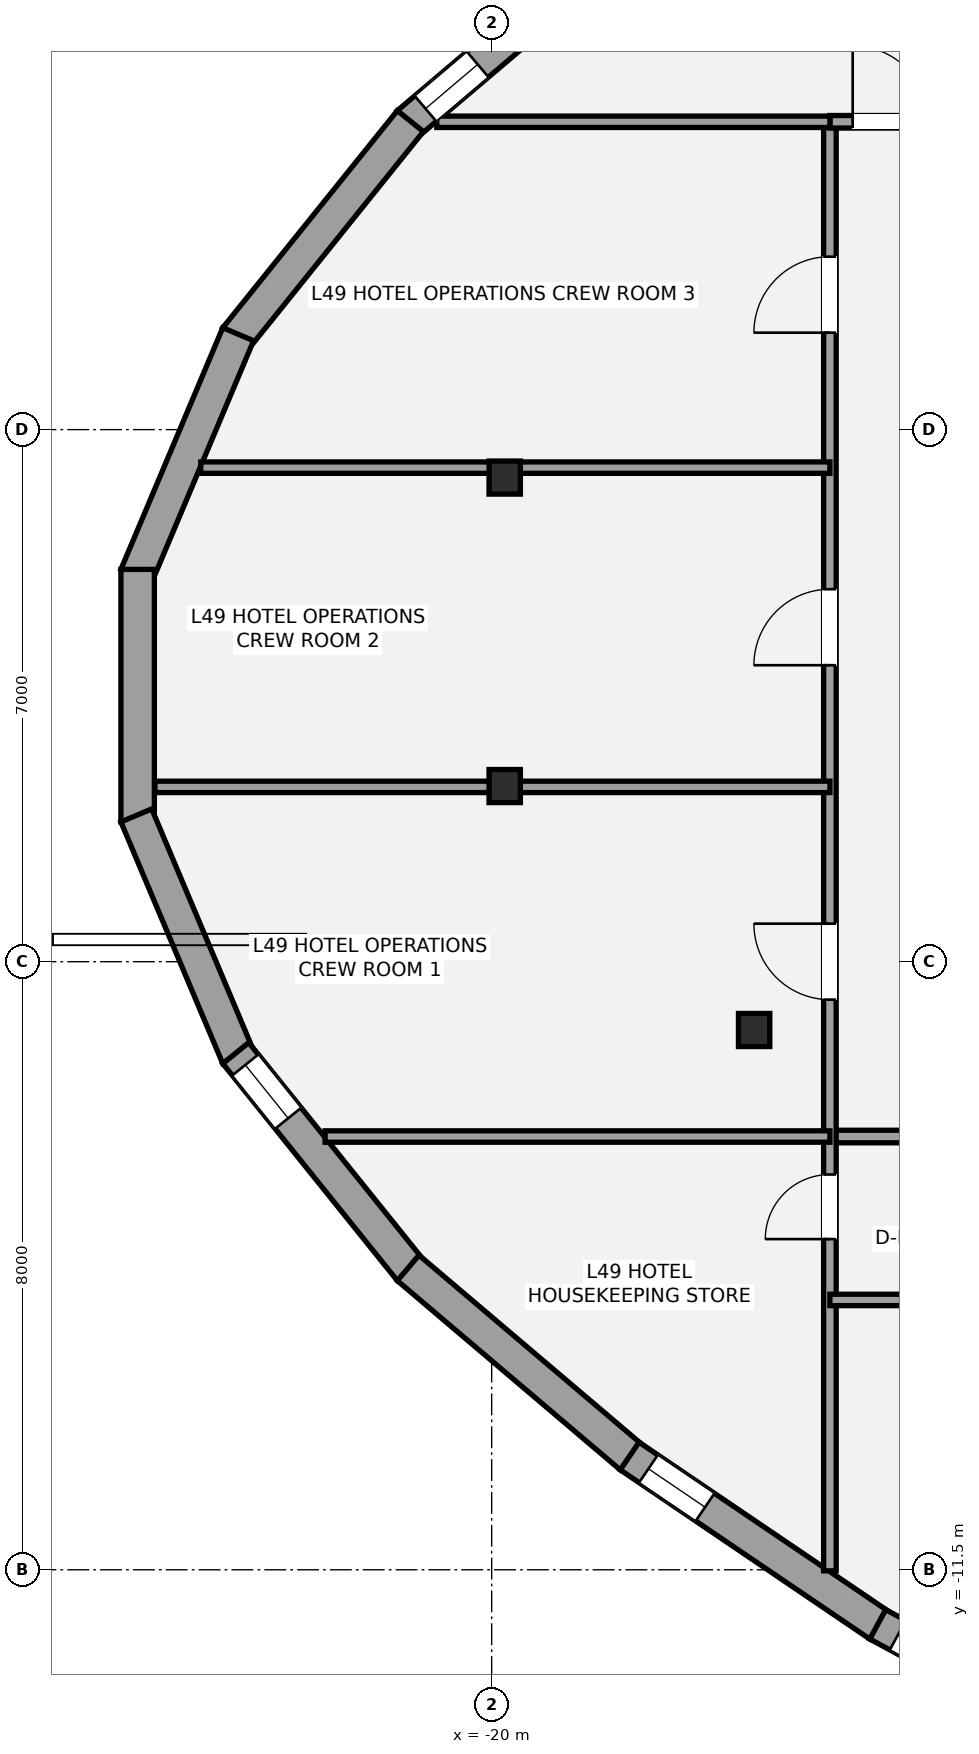
"""IFC4 building model, lengths in metres.
Left out: names, types, materials, properties, quantities, classifications, styles, units other than length and angle.
Written with IfcOpenShell. Run it as: python <this file> out.ifc"""

import sys

from ifc_helpers import new_model, si_unit, direction, frame, frame_2d, origin, origin_2d, place, context, subcontext, project, spatial, rectangle, i_section, extrude, element, fill, save


model = new_model("IFC4")
c1 = context("Model", 3, precision=1e-05, world=origin(), true_north=direction((0.0, 1.0)))
c2 = subcontext(c1, "Body", "Model", "MODEL_VIEW")
j1 = project(units=[si_unit("LENGTHUNIT", "METRE"), si_unit("PLANEANGLEUNIT", "RADIAN")], contexts=[c1])
p1 = place(None, origin())
s1 = spatial("IfcSite", under=j1, at=p1, CompositionType="ELEMENT")
p2 = place(p1, origin())
s2 = spatial("IfcBuilding", under=s1, at=p2, CompositionType="ELEMENT")
p3 = place(p2, frame((0.0, 0.0, 179.0)))
s3 = spatial("IfcBuildingStorey", under=s2, at=p3, CompositionType="ELEMENT", Elevation=179.0)
for number, where, z_axis, x_axis in (
    (1, (-19.828, 2.869, 0.0), (0.0, 0.0, 1.0), (1.0, 0.0, 0.0)),
    (2, (-19.828, -1.189, 0.0), (0.0, 0.0, 1.0), (1.0, 0.0, 0.0)),
    (3, (-16.547, -4.398, 0.0), (0.0, 0.0, 1.0), (1.0, 0.0, 0.0)),
):
    element("IfcColumn", number, at=place(p3, frame(where, z_axis=z_axis, x_axis=x_axis)), inside=s3, PredefinedType="COLUMN", context=c2, shape_type="SweptSolid", body=[
        extrude(i_section(OverallWidth=0.412, OverallDepth=0.435, WebThickness=0.036, FlangeThickness=0.057, at=origin_2d()), origin(), (0.0, 0.0, 1.0), 3.2),
    ])
p4 = place(p3, frame((-21.099, 7.529, 0.0), z_axis=(0.0, 0.0, 1.0), x_axis=(0.762499647343, 0.646988630349, 0.0)))
e4 = element("IfcWall", 4, at=p4, inside=s3, PredefinedType="STANDARD", context=c2, shape_type="SweptSolid", body=[
    extrude(rectangle(XDim=3.847, YDim=0.44, at=frame_2d((1.923, 0.0))), origin(), (0.0, 0.0, 1.0), 2.315),
])
p5 = place(p4, frame((0.3, 0.0, 0.42)))
e5 = element("IfcOpeningElement", 5, at=p5, cuts=e4, PredefinedType="OPENING", context=c2, shape_type="SweptSolid", body=[
    extrude(rectangle(XDim=0.9, YDim=1.35, at=frame_2d((0.45, 0.675))), frame((0.0, 0.23, 0.0), z_axis=(0.0, -1.0, 0.0), x_axis=(1.0, 0.0, 0.0)), (0.0, 0.0, 1.0), 0.46),
])
p6 = place(p3, frame((-23.367, 4.702, 0.0), z_axis=(0.0, 0.0, 1.0), x_axis=(0.626642586146, 0.779306787618, 0.0)))
e6 = element("IfcWall", 6, at=p6, inside=s3, PredefinedType="STANDARD", context=c2, shape_type="SweptSolid", body=[
    extrude(rectangle(XDim=3.665, YDim=0.44, at=frame_2d((1.833, 0.0))), origin(), (0.0, 0.0, 1.0), 2.315),
])
p7 = place(p3, frame((-24.675, 1.576, 0.0), z_axis=(0.0, 0.0, 1.0), x_axis=(0.388360687569, 0.9215074478, 0.0)))
e7 = element("IfcWall", 7, at=p7, inside=s3, PredefinedType="STANDARD", context=c2, shape_type="SweptSolid", body=[
    extrude(rectangle(XDim=3.45, YDim=0.44, at=frame_2d((1.725, 0.0))), origin(), (0.0, 0.0, 1.0), 2.315),
])
p8 = place(p3, frame((-24.658, -1.661, 0.0), z_axis=(0.0, 0.0, 1.0), x_axis=(0.0, 1.0, 0.0)))
e8 = element("IfcWall", 8, at=p8, inside=s3, PredefinedType="STANDARD", context=c2, shape_type="SweptSolid", body=[
    extrude(rectangle(XDim=3.322, YDim=0.44, at=frame_2d((1.661, 0.0))), origin(), (0.0, 0.0, 1.0), 2.315),
])
p9 = place(p3, frame((-23.335, -4.755, 0.0), z_axis=(0.0, 0.0, 1.0), x_axis=(-0.388360687569, 0.9215074478, 0.0)))
e9 = element("IfcWall", 9, at=p9, inside=s3, PredefinedType="STANDARD", context=c2, shape_type="SweptSolid", body=[
    extrude(rectangle(XDim=3.45, YDim=0.44, at=frame_2d((1.725, 0.0))), origin(), (0.0, 0.0, 1.0), 2.315),
])
p10 = place(p3, frame((-21.07, -7.559, 0.0), z_axis=(0.0, 0.0, 1.0), x_axis=(-0.626642586146, 0.779306787618, 0.0)))
e10 = element("IfcWall", 10, at=p10, inside=s3, PredefinedType="STANDARD", context=c2, shape_type="SweptSolid", body=[
    extrude(rectangle(XDim=3.665, YDim=0.44, at=frame_2d((1.833, 0.0))), origin(), (0.0, 0.0, 1.0), 2.315),
])
p11 = place(p10, frame((2.565, 0.0, 0.42)))
e11 = element("IfcOpeningElement", 11, at=p11, cuts=e10, PredefinedType="OPENING", context=c2, shape_type="SweptSolid", body=[
    extrude(rectangle(XDim=0.9, YDim=1.35, at=frame_2d((0.45, 0.675))), frame((0.0, 0.23, 0.0), z_axis=(0.0, -1.0, 0.0), x_axis=(1.0, 0.0, 0.0)), (0.0, 0.0, 1.0), 0.46),
])
p12 = place(p3, frame((-18.166, -10.018, 0.0), z_axis=(0.0, 0.0, 1.0), x_axis=(-0.762499647343, 0.646988630349, 0.0)))
e12 = element("IfcWall", 12, at=p12, inside=s3, PredefinedType="STANDARD", context=c2, shape_type="SweptSolid", body=[
    extrude(rectangle(XDim=3.847, YDim=0.44, at=frame_2d((1.923, 0.0))), origin(), (0.0, 0.0, 1.0), 2.315),
])
p13 = place(p3, frame((-14.902, -12.229, 0.0), z_axis=(0.0, 0.0, 1.0), x_axis=(-0.827725942945, 0.561132572015, 0.0)))
e13 = element("IfcWall", 13, at=p13, inside=s3, PredefinedType="STANDARD", context=c2, shape_type="SweptSolid", body=[
    extrude(rectangle(XDim=3.966, YDim=0.44, at=frame_2d((1.983, 0.0))), origin(), (0.0, 0.0, 1.0), 2.315),
])
p14 = place(p13, frame((2.768, 0.0, 0.58)))
e14 = element("IfcOpeningElement", 14, at=p14, cuts=e13, PredefinedType="OPENING", context=c2, shape_type="SweptSolid", body=[
    extrude(rectangle(XDim=0.9, YDim=1.35, at=frame_2d((0.45, 0.675))), frame((0.0, 0.23, 0.0), z_axis=(0.0, -1.0, 0.0), x_axis=(1.0, 0.0, 0.0)), (0.0, 0.0, 1.0), 0.46),
])
p15 = place(p3, frame((-11.249, -14.206, 0.0), z_axis=(0.0, 0.0, 1.0), x_axis=(-0.879306250646, 0.476256776933, 0.0)))
e15 = element("IfcWall", 15, at=p15, inside=s3, PredefinedType="STANDARD", context=c2, shape_type="SweptSolid", body=[
    extrude(rectangle(XDim=4.175, YDim=0.44, at=frame_2d((2.088, 0.0))), origin(), (0.0, 0.0, 1.0), 2.315),
])
p16 = place(p15, frame((2.976, 0.0, 0.58)))
e16 = element("IfcOpeningElement", 16, at=p16, cuts=e15, PredefinedType="OPENING", context=c2, shape_type="SweptSolid", body=[
    extrude(rectangle(XDim=0.9, YDim=1.35, at=frame_2d((0.45, 0.675))), frame((0.0, 0.23, 0.0), z_axis=(0.0, -1.0, 0.0), x_axis=(1.0, 0.0, 0.0)), (0.0, 0.0, 1.0), 0.46),
])
p17 = place(p3, frame((-15.55, -5.8, 0.0), z_axis=(0.0, 0.0, 1.0), x_axis=(1.0, 0.0, 0.0)))
e17 = element("IfcWall", 17, at=p17, inside=s3, PredefinedType="PARTITIONING", context=c2, shape_type="SweptSolid", body=[
    extrude(rectangle(XDim=31.1, YDim=0.165, at=frame_2d((15.55, 0.0))), origin(), (0.0, 0.0, 1.0), 2.398),
])
p18 = place(p17, frame((5.4, 0.0, 0.0)))
e18 = element("IfcOpeningElement", 18, at=p18, cuts=e17, PredefinedType="OPENING", context=c2, shape_type="SweptSolid", body=[
    extrude(rectangle(XDim=0.95, YDim=2.15, at=frame_2d((0.475, 1.075))), frame((0.0, 0.093, 0.0), z_axis=(0.0, -1.0, 0.0), x_axis=(1.0, 0.0, 0.0)), (0.0, 0.0, 1.0), 0.185),
])
p19 = place(p17, frame((13.2, 0.0, 0.0)))
e19 = element("IfcOpeningElement", 19, at=p19, cuts=e17, PredefinedType="OPENING", context=c2, shape_type="SweptSolid", body=[
    extrude(rectangle(XDim=0.95, YDim=2.15, at=frame_2d((0.475, 1.075))), frame((0.0, 0.093, 0.0), z_axis=(0.0, -1.0, 0.0), x_axis=(1.0, 0.0, 0.0)), (0.0, 0.0, 1.0), 0.185),
])
p20 = place(p17, frame((21.0, 0.0, 0.0)))
e20 = element("IfcOpeningElement", 20, at=p20, cuts=e17, PredefinedType="OPENING", context=c2, shape_type="SweptSolid", body=[
    extrude(rectangle(XDim=0.95, YDim=2.15, at=frame_2d((0.475, 1.075))), frame((0.0, 0.093, 0.0), z_axis=(0.0, -1.0, 0.0), x_axis=(1.0, 0.0, 0.0)), (0.0, 0.0, 1.0), 0.185),
])
p21 = place(p17, frame((29.75, 0.0, 0.0)))
e21 = element("IfcOpeningElement", 21, at=p21, cuts=e17, PredefinedType="OPENING", context=c2, shape_type="SweptSolid", body=[
    extrude(rectangle(XDim=0.95, YDim=2.15, at=frame_2d((0.475, 1.075))), frame((0.0, 0.093, 0.0), z_axis=(0.0, -1.0, 0.0), x_axis=(1.0, 0.0, 0.0)), (0.0, 0.0, 1.0), 0.185),
])
p22 = place(p3, frame((-15.55, -11.514, 0.0), z_axis=(0.0, 0.0, 1.0), x_axis=(0.0, 1.0, 0.0)))
e22 = element("IfcWall", 22, at=p22, inside=s3, PredefinedType="PARTITIONING", context=c2, shape_type="SweptSolid", body=[
    extrude(rectangle(XDim=19.064, YDim=0.165, at=frame_2d((9.532, 0.0))), origin(), (0.0, 0.0, 1.0), 2.473),
])
p23 = place(p22, frame((4.365, 0.0, 0.0)))
e23 = element("IfcOpeningElement", 23, at=p23, cuts=e22, PredefinedType="OPENING", context=c2, shape_type="SweptSolid", body=[
    extrude(rectangle(XDim=0.85, YDim=2.1, at=frame_2d((0.425, 1.05))), frame((0.0, 0.093, 0.0), z_axis=(0.0, -1.0, 0.0), x_axis=(1.0, 0.0, 0.0)), (0.0, 0.0, 1.0), 0.185),
])
p24 = place(p22, frame((7.515, 0.0, 0.0)))
e24 = element("IfcOpeningElement", 24, at=p24, cuts=e22, PredefinedType="OPENING", context=c2, shape_type="SweptSolid", body=[
    extrude(rectangle(XDim=1.0, YDim=2.15, at=frame_2d((0.5, 1.075))), frame((0.0, 0.093, 0.0), z_axis=(0.0, -1.0, 0.0), x_axis=(1.0, 0.0, 0.0)), (0.0, 0.0, 1.0), 0.185),
])
p25 = place(p22, frame((11.915, 0.0, 0.0)))
e25 = element("IfcOpeningElement", 25, at=p25, cuts=e22, PredefinedType="OPENING", context=c2, shape_type="SweptSolid", body=[
    extrude(rectangle(XDim=1.0, YDim=2.15, at=frame_2d((0.5, 1.075))), frame((0.0, 0.093, 0.0), z_axis=(0.0, -1.0, 0.0), x_axis=(1.0, 0.0, 0.0)), (0.0, 0.0, 1.0), 0.185),
])
p26 = place(p22, frame((16.29, 0.0, 0.0)))
e26 = element("IfcOpeningElement", 26, at=p26, cuts=e22, PredefinedType="OPENING", context=c2, shape_type="SweptSolid", body=[
    extrude(rectangle(XDim=1.0, YDim=2.15, at=frame_2d((0.5, 1.075))), frame((0.0, 0.093, 0.0), z_axis=(0.0, -1.0, 0.0), x_axis=(1.0, 0.0, 0.0)), (0.0, 0.0, 1.0), 0.185),
])
p27 = place(p3, frame((-15.55, 7.55, 0.0), z_axis=(0.0, 0.0, 1.0), x_axis=(1.0, 0.0, 0.0)))
e27 = element("IfcWall", 27, at=p27, inside=s3, PredefinedType="PARTITIONING", context=c2, shape_type="SweptSolid", body=[
    extrude(rectangle(XDim=1.75, YDim=0.165, at=frame_2d((0.875, 0.0))), origin(), (0.0, 0.0, 1.0), 3.02),
])
p28 = place(p27, frame((0.3, 0.0, 0.0)))
e28 = element("IfcOpeningElement", 28, at=p28, cuts=e27, PredefinedType="OPENING", context=c2, shape_type="SweptSolid", body=[
    extrude(rectangle(XDim=1.0, YDim=2.15, at=frame_2d((0.5, 1.075))), frame((0.0, 0.093, 0.0), z_axis=(0.0, -1.0, 0.0), x_axis=(1.0, 0.0, 0.0)), (0.0, 0.0, 1.0), 0.185),
])
p29 = place(p3, frame((-20.722, 7.55, 0.0), z_axis=(0.0, 0.0, 1.0), x_axis=(1.0, 0.0, 0.0)))
e29 = element("IfcWall", 29, at=p29, inside=s3, PredefinedType="PLUMBINGWALL", context=c2, shape_type="SweptSolid", body=[
    extrude(rectangle(XDim=5.172, YDim=0.15, at=frame_2d((2.586, 0.0))), origin(), (0.0, 0.0, 1.0), 2.473),
])
p30 = place(p3, frame((-22.192, -5.8, 0.0), z_axis=(0.0, 0.0, 1.0), x_axis=(1.0, 0.0, 0.0)))
e30 = element("IfcWall", 30, at=p30, inside=s3, PredefinedType="PLUMBINGWALL", context=c2, shape_type="SweptSolid", body=[
    extrude(rectangle(XDim=6.642, YDim=0.15, at=frame_2d((3.321, 0.0))), origin(), (0.0, 0.0, 1.0), 2.473),
])
p31 = place(p3, frame((-15.55, -7.95, 0.0), z_axis=(0.0, 0.0, 1.0), x_axis=(1.0, 0.0, 0.0)))
e31 = element("IfcWall", 31, at=p31, inside=s3, PredefinedType="PLUMBINGWALL", context=c2, shape_type="SweptSolid", body=[
    extrude(rectangle(XDim=1.85, YDim=0.15, at=frame_2d((0.925, 0.0))), origin(), (0.0, 0.0, 1.0), 2.473),
])
p32 = place(p3, frame((-24.43, -1.2, 0.0), z_axis=(0.0, 0.0, 1.0), x_axis=(1.0, 0.0, 0.0)))
e32 = element("IfcWall", 32, at=p32, inside=s3, PredefinedType="PLUMBINGWALL", context=c2, shape_type="SweptSolid", body=[
    extrude(rectangle(XDim=8.88, YDim=0.15, at=frame_2d((4.44, 0.0))), origin(), (0.0, 0.0, 1.0), 2.398),
])
p33 = place(p3, frame((-23.828, 3.0, 0.0), z_axis=(0.0, 0.0, 1.0), x_axis=(1.0, 0.0, 0.0)))
e33 = element("IfcWall", 33, at=p33, inside=s3, PredefinedType="PLUMBINGWALL", context=c2, shape_type="SweptSolid", body=[
    extrude(rectangle(XDim=8.278, YDim=0.15, at=frame_2d((4.139, 0.0))), origin(), (0.0, 0.0, 1.0), 2.473),
])
p34 = place(p5, origin())
e34 = element("IfcWindow", 34, at=p34, inside=s3, PartitioningType="SINGLE_PANEL", PredefinedType="WINDOW", context=c2, shape_type="SweptSolid", body=[
    extrude(rectangle(XDim=0.9, YDim=1.35, at=frame_2d((0.45, 0.675))), frame((0.0, -0.01, 0.0), z_axis=(0.0, -1.0, 0.0), x_axis=(1.0, 0.0, 0.0)), (0.0, 0.0, 1.0), 0.06),
])
fill(e5, e34)
p35 = place(p11, origin())
e35 = element("IfcWindow", 35, at=p35, inside=s3, PartitioningType="SINGLE_PANEL", PredefinedType="WINDOW", context=c2, shape_type="SweptSolid", body=[
    extrude(rectangle(XDim=0.9, YDim=1.35, at=frame_2d((0.45, 0.675))), frame((0.0, -0.01, 0.0), z_axis=(0.0, -1.0, 0.0), x_axis=(1.0, 0.0, 0.0)), (0.0, 0.0, 1.0), 0.06),
])
fill(e11, e35)
p36 = place(p14, origin())
e36 = element("IfcWindow", 36, at=p36, inside=s3, PartitioningType="SINGLE_PANEL", PredefinedType="WINDOW", context=c2, shape_type="SweptSolid", body=[
    extrude(rectangle(XDim=0.9, YDim=1.35, at=frame_2d((0.45, 0.675))), frame((0.0, -0.01, 0.0), z_axis=(0.0, -1.0, 0.0), x_axis=(1.0, 0.0, 0.0)), (0.0, 0.0, 1.0), 0.06),
])
fill(e14, e36)
p37 = place(p16, origin())
e37 = element("IfcWindow", 37, at=p37, inside=s3, PartitioningType="SINGLE_PANEL", PredefinedType="WINDOW", context=c2, shape_type="SweptSolid", body=[
    extrude(rectangle(XDim=0.9, YDim=1.35, at=frame_2d((0.45, 0.675))), frame((0.0, -0.01, 0.0), z_axis=(0.0, -1.0, 0.0), x_axis=(1.0, 0.0, 0.0)), (0.0, 0.0, 1.0), 0.06),
])
fill(e16, e37)
p38 = place(p28, origin())
e38 = element("IfcDoor", 38, at=p38, inside=s3, OperationType="SINGLE_SWING_LEFT", PredefinedType="DOOR", context=c2, shape_type="SweptSolid", body=[
    extrude(rectangle(XDim=1.0, YDim=2.15, at=frame_2d((0.5, 1.075))), frame((0.0, 0.025, 0.0), z_axis=(0.0, -1.0, 0.0), x_axis=(1.0, 0.0, 0.0)), (0.0, 0.0, 1.0), 0.05),
])
fill(e28, e38)
p39 = place(p23, origin())
e39 = element("IfcDoor", 39, at=p39, inside=s3, OperationType="SINGLE_SWING_LEFT", PredefinedType="DOOR", context=c2, shape_type="SweptSolid", body=[
    extrude(rectangle(XDim=0.85, YDim=2.1, at=frame_2d((0.425, 1.05))), frame((0.0, 0.025, 0.0), z_axis=(0.0, -1.0, 0.0), x_axis=(1.0, 0.0, 0.0)), (0.0, 0.0, 1.0), 0.05),
])
fill(e23, e39)
p40 = place(p24, origin())
e40 = element("IfcDoor", 40, at=p40, inside=s3, OperationType="SINGLE_SWING_RIGHT", PredefinedType="DOOR", context=c2, shape_type="SweptSolid", body=[
    extrude(rectangle(XDim=1.0, YDim=2.15, at=frame_2d((0.5, 1.075))), frame((0.0, 0.025, 0.0), z_axis=(0.0, -1.0, 0.0), x_axis=(1.0, 0.0, 0.0)), (0.0, 0.0, 1.0), 0.05),
])
fill(e24, e40)
p41 = place(p25, origin())
e41 = element("IfcDoor", 41, at=p41, inside=s3, OperationType="SINGLE_SWING_LEFT", PredefinedType="DOOR", context=c2, shape_type="SweptSolid", body=[
    extrude(rectangle(XDim=1.0, YDim=2.15, at=frame_2d((0.5, 1.075))), frame((0.0, 0.025, 0.0), z_axis=(0.0, -1.0, 0.0), x_axis=(1.0, 0.0, 0.0)), (0.0, 0.0, 1.0), 0.05),
])
fill(e25, e41)
p42 = place(p26, origin())
e42 = element("IfcDoor", 42, at=p42, inside=s3, OperationType="SINGLE_SWING_LEFT", PredefinedType="DOOR", context=c2, shape_type="SweptSolid", body=[
    extrude(rectangle(XDim=1.0, YDim=2.15, at=frame_2d((0.5, 1.075))), frame((0.0, 0.025, 0.0), z_axis=(0.0, -1.0, 0.0), x_axis=(1.0, 0.0, 0.0)), (0.0, 0.0, 1.0), 0.05),
])
fill(e26, e42)
save(model, sys.argv[1])
